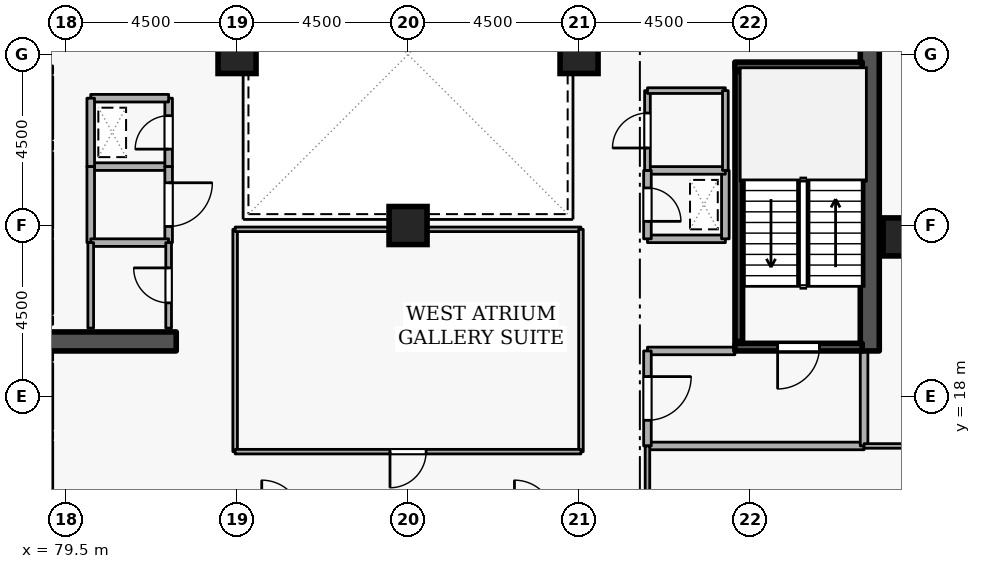
"""IFC4 building model, lengths in metres.
Left out: names, types, materials, properties, quantities, classifications, styles, units other than length and angle.
Written with IfcOpenShell. Run it as: python <this file> out.ifc"""

import sys

from ifc_helpers import new_model, si_unit, direction, frame, frame_2d, origin, origin_2d, place, context, subcontext, project, spatial, rectangle, extrude, element, fill, save


model = new_model("IFC4")
c1 = context("Model", 3, precision=1e-05, world=origin(), true_north=direction((0.0, 1.0)))
c2 = subcontext(c1, "Body", "Model", "MODEL_VIEW")
j1 = project(units=[si_unit("LENGTHUNIT", "METRE"), si_unit("PLANEANGLEUNIT", "RADIAN")], contexts=[c1])
p1 = place(None, origin())
s1 = spatial("IfcSite", under=j1, at=p1, CompositionType="ELEMENT")
p2 = place(p1, origin())
s2 = spatial("IfcBuilding", under=s1, at=p2, CompositionType="ELEMENT")
p3 = place(p2, frame((0.0, 0.0, 200.1)))
s3 = spatial("IfcBuildingStorey", under=s2, at=p3, CompositionType="ELEMENT", Elevation=200.1)
p4 = place(p3, frame((100.65, 19.2, 0.0), z_axis=(0.0, 0.0, 1.0), x_axis=(0.0, 1.0, 0.0)))
e1 = element("IfcWall", 1, at=p4, inside=s3, PredefinedType="SHEAR", context=c2, shape_type="SweptSolid", body=[
    extrude(rectangle(XDim=15.6, YDim=0.5, at=frame_2d((7.8, 0.0))), origin(), (0.0, 0.0, 1.0), 3.6),
])
p5 = place(p3, frame((76.6, 19.45, 0.0), z_axis=(0.0, 0.0, 1.0), x_axis=(1.0, 0.0, 0.0)))
e2 = element("IfcWall", 2, at=p5, inside=s3, PredefinedType="SHEAR", context=c2, shape_type="SweptSolid", body=[
    extrude(rectangle(XDim=5.8, YDim=0.5, at=frame_2d((2.9, 0.0))), origin(), (0.0, 0.0, 1.0), 3.6),
])
for number, where, z_axis, x_axis in (
    (3, (101.5, 22.2, 0.0), (0.0, 0.0, 1.0), (1.0, 0.0, 0.0)),
    (4, (93.0, 27.0, 0.0), (0.0, 0.0, 1.0), (1.0, 0.0, 0.0)),
    (5, (84.0, 27.0, 0.0), (0.0, 0.0, 1.0), (1.0, 0.0, 0.0)),
    (6, (88.5, 22.5, 0.0), (0.0, 0.0, 1.0), (1.0, 0.0, 0.0)),
):
    element("IfcColumn", number, at=place(p3, frame(where, z_axis=z_axis, x_axis=x_axis)), inside=s3, PredefinedType="COLUMN", context=c2, shape_type="SweptSolid", body=[
        extrude(rectangle(XDim=1.0, YDim=1.0, at=origin_2d()), origin(), (0.0, 0.0, 1.0), 3.6),
    ])
p6 = place(p3, frame((79.05, 24.78, 0.0), z_axis=(0.0, 0.0, 1.0), x_axis=(0.0, 1.0, 0.0)))
e7 = element("IfcWall", 7, at=p6, inside=s3, PredefinedType="STANDARD", context=c2, shape_type="SweptSolid", body=[
    extrude(rectangle(XDim=1.64, YDim=0.2, at=frame_2d((0.82, 0.0))), origin(), (0.0, 0.0, 1.0), 3.32),
])
p7 = place(p6, frame((0.31, 0.0, 0.0)))
e8 = element("IfcOpeningElement", 8, at=p7, cuts=e7, PredefinedType="OPENING", context=c2, shape_type="SweptSolid", body=[
    extrude(rectangle(XDim=1.02, YDim=2.06, at=frame_2d((0.51, 1.03))), frame((0.0, 0.11, 0.0), z_axis=(0.0, -1.0, 0.0), x_axis=(1.0, 0.0, 0.0)), (0.0, 0.0, 1.0), 0.22),
])
p8 = place(p3, frame((79.05, 22.43, 0.0), z_axis=(0.0, 0.0, 1.0), x_axis=(0.0, 1.0, 0.0)))
e9 = element("IfcWall", 9, at=p8, inside=s3, PredefinedType="STANDARD", context=c2, shape_type="SweptSolid", body=[
    extrude(rectangle(XDim=1.99, YDim=0.2, at=frame_2d((0.995, 0.0))), origin(), (0.0, 0.0, 1.0), 3.32),
])
p9 = place(p8, frame((0.485, 0.0, 0.0)))
e10 = element("IfcOpeningElement", 10, at=p9, cuts=e9, PredefinedType="OPENING", context=c2, shape_type="SweptSolid", body=[
    extrude(rectangle(XDim=1.02, YDim=2.06, at=frame_2d((0.51, 1.03))), frame((0.0, 0.11, 0.0), z_axis=(0.0, -1.0, 0.0), x_axis=(1.0, 0.0, 0.0)), (0.0, 0.0, 1.0), 0.22),
])
p10 = place(p3, frame((79.05, 20.18, 0.0), z_axis=(0.0, 0.0, 1.0), x_axis=(0.0, 1.0, 0.0)))
e11 = element("IfcWall", 11, at=p10, inside=s3, PredefinedType="STANDARD", context=c2, shape_type="SweptSolid", body=[
    extrude(rectangle(XDim=1.94, YDim=0.2, at=frame_2d((0.97, 0.0))), origin(), (0.0, 0.0, 1.0), 3.32),
])
p11 = place(p10, frame((0.46, 0.0, 0.0)))
e12 = element("IfcOpeningElement", 12, at=p11, cuts=e11, PredefinedType="OPENING", context=c2, shape_type="SweptSolid", body=[
    extrude(rectangle(XDim=1.02, YDim=2.06, at=frame_2d((0.51, 1.03))), frame((0.0, 0.11, 0.0), z_axis=(0.0, -1.0, 0.0), x_axis=(1.0, 0.0, 0.0)), (0.0, 0.0, 1.0), 0.22),
])
p12 = place(p3, frame((79.05, 17.13, 0.0), z_axis=(0.0, 0.0, 1.0), x_axis=(0.0, 1.0, 0.0)))
e13 = element("IfcWall", 13, at=p12, inside=s3, PredefinedType="STANDARD", context=c2, shape_type="SweptSolid", body=[
    extrude(rectangle(XDim=1.74, YDim=0.2, at=frame_2d((0.87, 0.0))), origin(), (0.0, 0.0, 1.0), 3.32),
])
p13 = place(p3, frame((79.05, 15.03, 0.0), z_axis=(0.0, 0.0, 1.0), x_axis=(0.0, 1.0, 0.0)))
e14 = element("IfcWall", 14, at=p13, inside=s3, PredefinedType="STANDARD", context=c2, shape_type="SweptSolid", body=[
    extrude(rectangle(XDim=1.79, YDim=0.2, at=frame_2d((0.895, 0.0))), origin(), (0.0, 0.0, 1.0), 3.32),
])
p14 = place(p3, frame((100.45, 19.3, 0.0), z_axis=(0.0, 0.0, 1.0), x_axis=(-1.0, 0.0, 0.0)))
e15 = element("IfcWall", 15, at=p14, inside=s3, PredefinedType="SHEAR", context=c2, shape_type="SweptSolid", body=[
    extrude(rectangle(XDim=3.35, YDim=0.2, at=frame_2d((1.675, 0.0))), origin(), (0.0, 0.0, 1.0), 3.6),
])
p15 = place(p14, frame((1.125, 0.0, 0.0)))
e16 = element("IfcOpeningElement", 16, at=p15, cuts=e15, PredefinedType="OPENING", context=c2, shape_type="SweptSolid", body=[
    extrude(rectangle(XDim=1.1, YDim=2.1, at=frame_2d((0.55, 1.05))), frame((0.0, 0.11, 0.0), z_axis=(0.0, -1.0, 0.0), x_axis=(1.0, 0.0, 0.0)), (0.0, 0.0, 1.0), 0.22),
])
p16 = place(p3, frame((97.1, 26.7, 0.0), z_axis=(0.0, 0.0, 1.0), x_axis=(1.0, 0.0, 0.0)))
e17 = element("IfcWall", 17, at=p16, inside=s3, PredefinedType="SHEAR", context=c2, shape_type="SweptSolid", body=[
    extrude(rectangle(XDim=3.35, YDim=0.2, at=frame_2d((1.675, 0.0))), origin(), (0.0, 0.0, 1.0), 3.6),
])
p17 = place(p3, frame((97.203, 26.55, 0.0), z_axis=(0.0, 0.0, 1.0), x_axis=(0.0, -1.0, 0.0)))
e18 = element("IfcWall", 18, at=p17, inside=s3, PredefinedType="SHEAR", context=c2, shape_type="SweptSolid", body=[
    extrude(rectangle(XDim=7.1, YDim=0.2, at=frame_2d((3.55, 0.0))), origin(), (0.0, 0.0, 1.0), 3.6),
])
p18 = place(p3, frame((94.8, 16.7, 0.0), z_axis=(0.0, 0.0, 1.0), x_axis=(1.0, 0.0, 0.0)))
e19 = element("IfcWall", 19, at=p18, inside=s3, PredefinedType="STANDARD", context=c2, shape_type="SweptSolid", body=[
    extrude(rectangle(XDim=5.7, YDim=0.2, at=frame_2d((2.85, 0.0))), origin(), (0.0, 0.0, 1.0), 3.32),
])
p19 = place(p3, frame((100.5, 16.7, 0.0), z_axis=(0.0, 0.0, 1.0), x_axis=(0.0, 1.0, 0.0)))
e20 = element("IfcWall", 20, at=p19, inside=s3, PredefinedType="STANDARD", context=c2, shape_type="SweptSolid", body=[
    extrude(rectangle(XDim=2.5, YDim=0.2, at=frame_2d((1.25, 0.0))), origin(), (0.0, 0.0, 1.0), 3.32),
])
p20 = place(p3, frame((97.1, 19.2, 0.0), z_axis=(0.0, 0.0, 1.0), x_axis=(-1.0, 0.0, 0.0)))
e21 = element("IfcWall", 21, at=p20, inside=s3, PredefinedType="STANDARD", context=c2, shape_type="SweptSolid", body=[
    extrude(rectangle(XDim=2.3, YDim=0.2, at=frame_2d((1.15, 0.0))), origin(), (0.0, 0.0, 1.0), 2.525),
])
p21 = place(p3, frame((94.8, 19.2, 0.0), z_axis=(0.0, 0.0, 1.0), x_axis=(0.0, -1.0, 0.0)))
e22 = element("IfcWall", 22, at=p21, inside=s3, PredefinedType="STANDARD", context=c2, shape_type="SweptSolid", body=[
    extrude(rectangle(XDim=2.5, YDim=0.2, at=frame_2d((1.25, 0.0))), origin(), (0.0, 0.0, 1.0), 3.32),
])
p22 = place(p21, frame((0.675, 0.0, 0.0)))
e23 = element("IfcOpeningElement", 23, at=p22, cuts=e22, PredefinedType="OPENING", context=c2, shape_type="SweptSolid", body=[
    extrude(rectangle(XDim=1.15, YDim=2.1, at=frame_2d((0.575, 1.05))), frame((0.0, 0.11, 0.0), z_axis=(0.0, -1.0, 0.0), x_axis=(1.0, 0.0, 0.0)), (0.0, 0.0, 1.0), 0.22),
])
p23 = place(p3, frame((94.8, 22.15, 0.0), z_axis=(0.0, 0.0, 1.0), x_axis=(1.0, 0.0, 0.0)))
e24 = element("IfcWall", 24, at=p23, inside=s3, PredefinedType="STANDARD", context=c2, shape_type="SweptSolid", body=[
    extrude(rectangle(XDim=2.05, YDim=0.2, at=frame_2d((1.025, 0.0))), origin(), (0.0, 0.0, 1.0), 3.32),
])
p24 = place(p3, frame((96.85, 22.15, 0.0), z_axis=(0.0, 0.0, 1.0), x_axis=(0.0, 1.0, 0.0)))
e25 = element("IfcWall", 25, at=p24, inside=s3, PredefinedType="STANDARD", context=c2, shape_type="SweptSolid", body=[
    extrude(rectangle(XDim=1.8, YDim=0.2, at=frame_2d((0.9, 0.0))), origin(), (0.0, 0.0, 1.0), 3.32),
])
p25 = place(p3, frame((96.85, 23.95, 0.0), z_axis=(0.0, 0.0, 1.0), x_axis=(-1.0, 0.0, 0.0)))
e26 = element("IfcWall", 26, at=p25, inside=s3, PredefinedType="STANDARD", context=c2, shape_type="SweptSolid", body=[
    extrude(rectangle(XDim=2.05, YDim=0.2, at=frame_2d((1.025, 0.0))), origin(), (0.0, 0.0, 1.0), 3.32),
])
p26 = place(p3, frame((94.8, 23.95, 0.0), z_axis=(0.0, 0.0, 1.0), x_axis=(0.0, -1.0, 0.0)))
e27 = element("IfcWall", 27, at=p26, inside=s3, PredefinedType="STANDARD", context=c2, shape_type="SweptSolid", body=[
    extrude(rectangle(XDim=1.8, YDim=0.2, at=frame_2d((0.9, 0.0))), origin(), (0.0, 0.0, 1.0), 3.32),
])
p27 = place(p26, frame((0.46, 0.0, 0.0)))
e28 = element("IfcOpeningElement", 28, at=p27, cuts=e27, PredefinedType="OPENING", context=c2, shape_type="SweptSolid", body=[
    extrude(rectangle(XDim=0.88, YDim=2.04, at=frame_2d((0.44, 1.02))), frame((0.0, 0.11, 0.0), z_axis=(0.0, -1.0, 0.0), x_axis=(1.0, 0.0, 0.0)), (0.0, 0.0, 1.0), 0.22),
])
p28 = place(p3, frame((80.15, 24.05, 0.0), z_axis=(0.0, 0.0, 1.0), x_axis=(1.0, 0.0, 0.0)))
e29 = element("IfcWall", 29, at=p28, inside=s3, PredefinedType="STANDARD", context=c2, shape_type="SweptSolid", body=[
    extrude(rectangle(XDim=2.05, YDim=0.2, at=frame_2d((1.025, 0.0))), origin(), (0.0, 0.0, 1.0), 3.32),
])
p29 = place(p3, frame((82.2, 24.05, 0.0), z_axis=(0.0, 0.0, 1.0), x_axis=(0.0, 1.0, 0.0)))
e30 = element("IfcWall", 30, at=p29, inside=s3, PredefinedType="STANDARD", context=c2, shape_type="SweptSolid", body=[
    extrude(rectangle(XDim=1.8, YDim=0.2, at=frame_2d((0.9, 0.0))), origin(), (0.0, 0.0, 1.0), 3.32),
])
p30 = place(p29, frame((0.46, 0.0, 0.0)))
e31 = element("IfcOpeningElement", 31, at=p30, cuts=e30, PredefinedType="OPENING", context=c2, shape_type="SweptSolid", body=[
    extrude(rectangle(XDim=0.88, YDim=2.04, at=frame_2d((0.44, 1.02))), frame((0.0, 0.11, 0.0), z_axis=(0.0, -1.0, 0.0), x_axis=(1.0, 0.0, 0.0)), (0.0, 0.0, 1.0), 0.22),
])
p31 = place(p3, frame((82.2, 25.85, 0.0), z_axis=(0.0, 0.0, 1.0), x_axis=(-1.0, 0.0, 0.0)))
e32 = element("IfcWall", 32, at=p31, inside=s3, PredefinedType="STANDARD", context=c2, shape_type="SweptSolid", body=[
    extrude(rectangle(XDim=2.05, YDim=0.2, at=frame_2d((1.025, 0.0))), origin(), (0.0, 0.0, 1.0), 3.32),
])
p32 = place(p3, frame((80.15, 25.85, 0.0), z_axis=(0.0, 0.0, 1.0), x_axis=(0.0, -1.0, 0.0)))
e33 = element("IfcWall", 33, at=p32, inside=s3, PredefinedType="STANDARD", context=c2, shape_type="SweptSolid", body=[
    extrude(rectangle(XDim=1.8, YDim=0.2, at=frame_2d((0.9, 0.0))), origin(), (0.0, 0.0, 1.0), 3.32),
])
p33 = place(p3, frame((80.15, 22.05, 0.0), z_axis=(0.0, 0.0, 1.0), x_axis=(0.0, 1.0, 0.0)))
e34 = element("IfcWall", 34, at=p33, inside=s3, PredefinedType="STANDARD", context=c2, shape_type="SweptSolid", body=[
    extrude(rectangle(XDim=2.0, YDim=0.2, at=frame_2d((1.0, 0.0))), origin(), (0.0, 0.0, 1.0), 3.32),
])
p34 = place(p3, frame((82.2, 24.05, 0.0), z_axis=(0.0, 0.0, 1.0), x_axis=(0.0, -1.0, 0.0)))
e35 = element("IfcWall", 35, at=p34, inside=s3, PredefinedType="STANDARD", context=c2, shape_type="SweptSolid", body=[
    extrude(rectangle(XDim=2.0, YDim=0.2, at=frame_2d((1.0, 0.0))), origin(), (0.0, 0.0, 1.0), 3.32),
])
p35 = place(p34, frame((0.425, 0.0, 0.0)))
e36 = element("IfcOpeningElement", 36, at=p35, cuts=e35, PredefinedType="OPENING", context=c2, shape_type="SweptSolid", body=[
    extrude(rectangle(XDim=1.15, YDim=2.1, at=frame_2d((0.575, 1.05))), frame((0.0, 0.11, 0.0), z_axis=(0.0, -1.0, 0.0), x_axis=(1.0, 0.0, 0.0)), (0.0, 0.0, 1.0), 0.22),
])
p36 = place(p3, frame((82.2, 22.05, 0.0), z_axis=(0.0, 0.0, 1.0), x_axis=(-1.0, 0.0, 0.0)))
e37 = element("IfcWall", 37, at=p36, inside=s3, PredefinedType="STANDARD", context=c2, shape_type="SweptSolid", body=[
    extrude(rectangle(XDim=2.05, YDim=0.2, at=frame_2d((1.025, 0.0))), origin(), (0.0, 0.0, 1.0), 3.32),
])
p37 = place(p3, frame((94.8, 23.95, 0.0), z_axis=(0.0, 0.0, 1.0), x_axis=(0.0, 1.0, 0.0)))
e38 = element("IfcWall", 38, at=p37, inside=s3, PredefinedType="PARTITIONING", context=c2, shape_type="SweptSolid", body=[
    extrude(rectangle(XDim=2.1, YDim=0.15, at=frame_2d((1.05, 0.0))), origin(), (0.0, 0.0, 1.0), 3.32),
])
p38 = place(p37, frame((0.59, 0.0, 0.0)))
e39 = element("IfcOpeningElement", 39, at=p38, cuts=e38, PredefinedType="OPENING", context=c2, shape_type="SweptSolid", body=[
    extrude(rectangle(XDim=0.92, YDim=2.08, at=frame_2d((0.46, 1.04))), frame((0.0, 0.085, 0.0), z_axis=(0.0, -1.0, 0.0), x_axis=(1.0, 0.0, 0.0)), (0.0, 0.0, 1.0), 0.17),
])
p39 = place(p3, frame((94.8, 26.05, 0.0), z_axis=(0.0, 0.0, 1.0), x_axis=(1.0, 0.0, 0.0)))
e40 = element("IfcWall", 40, at=p39, inside=s3, PredefinedType="PARTITIONING", context=c2, shape_type="SweptSolid", body=[
    extrude(rectangle(XDim=2.05, YDim=0.15, at=frame_2d((1.025, 0.0))), origin(), (0.0, 0.0, 1.0), 3.32),
])
p40 = place(p3, frame((96.85, 26.05, 0.0), z_axis=(0.0, 0.0, 1.0), x_axis=(0.0, -1.0, 0.0)))
e41 = element("IfcWall", 41, at=p40, inside=s3, PredefinedType="PARTITIONING", context=c2, shape_type="SweptSolid", body=[
    extrude(rectangle(XDim=2.1, YDim=0.15, at=frame_2d((1.05, 0.0))), origin(), (0.0, 0.0, 1.0), 3.32),
])
p41 = place(p3, frame((82.2, 19.8, 0.0), z_axis=(0.0, 0.0, 1.0), x_axis=(0.0, 1.0, 0.0)))
e42 = element("IfcWall", 42, at=p41, inside=s3, PredefinedType="PARTITIONING", context=c2, shape_type="SweptSolid", body=[
    extrude(rectangle(XDim=2.25, YDim=0.15, at=frame_2d((1.125, 0.0))), origin(), (0.0, 0.0, 1.0), 3.32),
])
p42 = place(p41, frame((0.665, 0.0, 0.0)))
e43 = element("IfcOpeningElement", 43, at=p42, cuts=e42, PredefinedType="OPENING", context=c2, shape_type="SweptSolid", body=[
    extrude(rectangle(XDim=0.92, YDim=2.08, at=frame_2d((0.46, 1.04))), frame((0.0, 0.085, 0.0), z_axis=(0.0, -1.0, 0.0), x_axis=(1.0, 0.0, 0.0)), (0.0, 0.0, 1.0), 0.17),
])
p43 = place(p3, frame((80.15, 22.05, 0.0), z_axis=(0.0, 0.0, 1.0), x_axis=(0.0, -1.0, 0.0)))
e44 = element("IfcWall", 44, at=p43, inside=s3, PredefinedType="PARTITIONING", context=c2, shape_type="SweptSolid", body=[
    extrude(rectangle(XDim=2.25, YDim=0.15, at=frame_2d((1.125, 0.0))), origin(), (0.0, 0.0, 1.0), 3.32),
])
p44 = place(p3, frame((94.8, 14.75, 0.0), z_axis=(0.0, 0.0, 1.0), x_axis=(0.0, 1.0, 0.0)))
e45 = element("IfcWall", 45, at=p44, inside=s3, PredefinedType="PARTITIONING", context=c2, shape_type="SweptSolid", body=[
    extrude(rectangle(XDim=1.95, YDim=0.12, at=frame_2d((0.975, 0.0))), origin(), (0.0, 0.0, 1.0), 3.32),
])
p45 = place(p3, frame((100.5, 16.7, 0.0), z_axis=(0.0, 0.0, 1.0), x_axis=(1.0, 0.0, 0.0)))
e46 = element("IfcWall", 46, at=p45, inside=s3, PredefinedType="PARTITIONING", context=c2, shape_type="SweptSolid", body=[
    extrude(rectangle(XDim=5.72, YDim=0.12, at=frame_2d((2.86, 0.0))), origin(), (0.0, 0.0, 1.0), 3.32),
])
p46 = place(p3, frame((83.95, 16.55, 0.0), z_axis=(0.0, 0.0, 1.0), x_axis=(0.0, 1.0, 0.0)))
e47 = element("IfcWall", 47, at=p46, inside=s3, PredefinedType="PARTITIONING", context=c2, shape_type="SweptSolid", body=[
    extrude(rectangle(XDim=5.85, YDim=0.12, at=frame_2d((2.925, 0.0))), origin(), (0.0, 0.0, 1.0), 3.32),
])
p47 = place(p3, frame((83.95, 22.4, 0.0), z_axis=(0.0, 0.0, 1.0), x_axis=(1.0, 0.0, 0.0)))
e48 = element("IfcWall", 48, at=p47, inside=s3, PredefinedType="PARTITIONING", context=c2, shape_type="SweptSolid", body=[
    extrude(rectangle(XDim=9.1, YDim=0.12, at=frame_2d((4.55, 0.0))), origin(), (0.0, 0.0, 1.0), 3.32),
])
p48 = place(p3, frame((93.05, 22.4, 0.0), z_axis=(0.0, 0.0, 1.0), x_axis=(0.0, -1.0, 0.0)))
e49 = element("IfcWall", 49, at=p48, inside=s3, PredefinedType="PARTITIONING", context=c2, shape_type="SweptSolid", body=[
    extrude(rectangle(XDim=5.85, YDim=0.12, at=frame_2d((2.925, 0.0))), origin(), (0.0, 0.0, 1.0), 3.32),
])
p49 = place(p3, frame((93.05, 16.55, 0.0), z_axis=(0.0, 0.0, 1.0), x_axis=(-1.0, 0.0, 0.0)))
e50 = element("IfcWall", 50, at=p49, inside=s3, PredefinedType="PARTITIONING", context=c2, shape_type="SweptSolid", body=[
    extrude(rectangle(XDim=9.1, YDim=0.12, at=frame_2d((4.55, 0.0))), origin(), (0.0, 0.0, 1.0), 3.32),
])
p50 = place(p49, frame((4.075, 0.0, 0.0)))
e51 = element("IfcOpeningElement", 51, at=p50, cuts=e50, PredefinedType="OPENING", context=c2, shape_type="SweptSolid", body=[
    extrude(rectangle(XDim=0.95, YDim=2.1, at=frame_2d((0.475, 1.05))), frame((0.0, 0.07, 0.0), z_axis=(0.0, -1.0, 0.0), x_axis=(1.0, 0.0, 0.0)), (0.0, 0.0, 1.0), 0.14),
])
p51 = place(p15, origin())
e52 = element("IfcDoor", 52, at=p51, inside=s3, OperationType="SINGLE_SWING_RIGHT", PredefinedType="DOOR", context=c2, shape_type="SweptSolid", body=[
    extrude(rectangle(XDim=1.1, YDim=2.1, at=frame_2d((0.55, 1.05))), frame((0.0, 0.025, 0.0), z_axis=(0.0, -1.0, 0.0), x_axis=(1.0, 0.0, 0.0)), (0.0, 0.0, 1.0), 0.05),
])
fill(e16, e52)
p52 = place(p22, origin())
e53 = element("IfcDoor", 53, at=p52, inside=s3, OperationType="SINGLE_SWING_LEFT", PredefinedType="DOOR", context=c2, shape_type="SweptSolid", body=[
    extrude(rectangle(XDim=1.15, YDim=2.1, at=frame_2d((0.575, 1.05))), frame((0.0, 0.025, 0.0), z_axis=(0.0, -1.0, 0.0), x_axis=(1.0, 0.0, 0.0)), (0.0, 0.0, 1.0), 0.05),
])
fill(e23, e53)
p53 = place(p27, origin())
e54 = element("IfcDoor", 54, at=p53, inside=s3, OperationType="SINGLE_SWING_RIGHT", PredefinedType="DOOR", context=c2, shape_type="SweptSolid", body=[
    extrude(rectangle(XDim=0.88, YDim=2.04, at=frame_2d((0.44, 1.02))), frame((0.0, 0.025, 0.0), z_axis=(0.0, -1.0, 0.0), x_axis=(1.0, 0.0, 0.0)), (0.0, 0.0, 1.0), 0.05),
])
fill(e28, e54)
p54 = place(p30, origin())
e55 = element("IfcDoor", 55, at=p54, inside=s3, OperationType="SINGLE_SWING_LEFT", PredefinedType="DOOR", context=c2, shape_type="SweptSolid", body=[
    extrude(rectangle(XDim=0.88, YDim=2.04, at=frame_2d((0.44, 1.02))), frame((0.0, 0.025, 0.0), z_axis=(0.0, -1.0, 0.0), x_axis=(1.0, 0.0, 0.0)), (0.0, 0.0, 1.0), 0.05),
])
fill(e31, e55)
p55 = place(p38, origin())
e56 = element("IfcDoor", 56, at=p55, inside=s3, OperationType="SINGLE_SWING_LEFT", PredefinedType="DOOR", context=c2, shape_type="SweptSolid", body=[
    extrude(rectangle(XDim=0.92, YDim=2.08, at=frame_2d((0.46, 1.04))), frame((0.0, 0.025, 0.0), z_axis=(0.0, -1.0, 0.0), x_axis=(1.0, 0.0, 0.0)), (0.0, 0.0, 1.0), 0.05),
])
fill(e39, e56)
p56 = place(p42, origin())
e57 = element("IfcDoor", 57, at=p56, inside=s3, OperationType="SINGLE_SWING_RIGHT", PredefinedType="DOOR", context=c2, shape_type="SweptSolid", body=[
    extrude(rectangle(XDim=0.92, YDim=2.08, at=frame_2d((0.46, 1.04))), frame((0.0, 0.025, 0.0), z_axis=(0.0, -1.0, 0.0), x_axis=(1.0, 0.0, 0.0)), (0.0, 0.0, 1.0), 0.05),
])
fill(e43, e57)
p57 = place(p35, origin())
e58 = element("IfcDoor", 58, at=p57, inside=s3, OperationType="SINGLE_SWING_LEFT", PredefinedType="DOOR", context=c2, shape_type="SweptSolid", body=[
    extrude(rectangle(XDim=1.15, YDim=2.1, at=frame_2d((0.575, 1.05))), frame((0.0, 0.025, 0.0), z_axis=(0.0, -1.0, 0.0), x_axis=(1.0, 0.0, 0.0)), (0.0, 0.0, 1.0), 0.05),
])
fill(e36, e58)
p58 = place(p50, origin())
e59 = element("IfcDoor", 59, at=p58, inside=s3, OperationType="SINGLE_SWING_RIGHT", PredefinedType="DOOR", context=c2, shape_type="SweptSolid", body=[
    extrude(rectangle(XDim=0.95, YDim=2.1, at=frame_2d((0.475, 1.05))), frame((0.0, 0.025, 0.0), z_axis=(0.0, -1.0, 0.0), x_axis=(1.0, 0.0, 0.0)), (0.0, 0.0, 1.0), 0.05),
])
fill(e51, e59)
save(model, sys.argv[1])
